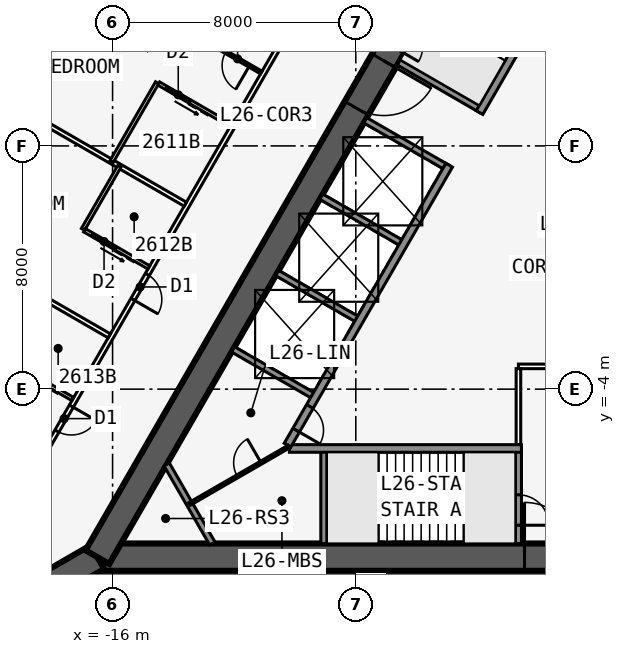
"""IFC4 building model, lengths in metres.
Left out: names, types, materials, properties, quantities, classifications, styles, units other than length and angle.
Written with IfcOpenShell. Run it as: python <this file> out.ifc"""

import sys

from ifc_helpers import new_model, si_unit, direction, frame, frame_2d, origin, place, context, subcontext, project, spatial, rectangle, extrude, element, fill, save


model = new_model("IFC4")
c1 = context("Model", 3, precision=1e-05, world=origin(), true_north=direction((0.0, 1.0)))
c2 = subcontext(c1, "Body", "Model", "MODEL_VIEW")
j1 = project(units=[si_unit("LENGTHUNIT", "METRE"), si_unit("PLANEANGLEUNIT", "RADIAN")], contexts=[c1])
p1 = place(None, origin())
s1 = spatial("IfcSite", under=j1, at=p1, CompositionType="ELEMENT")
p2 = place(p1, origin())
s2 = spatial("IfcBuilding", under=s1, at=p2, CompositionType="ELEMENT")
p3 = place(p2, frame((0.0, 0.0, 99.9)))
s3 = spatial("IfcBuildingStorey", under=s2, at=p3, CompositionType="ELEMENT", Elevation=99.9)
p4 = place(p3, frame((-16.5, -9.526, 0.0), z_axis=(0.0, 0.0, 1.0), x_axis=(1.0, 0.0, 0.0)))
e1 = element("IfcWall", 1, at=p4, inside=s3, PredefinedType="SHEAR", context=c2, shape_type="SweptSolid", body=[
    extrude(rectangle(XDim=33.0, YDim=0.9, at=frame_2d((16.5, 0.0))), origin(), (0.0, 0.0, 1.0), 3.4),
])
p5 = place(p4, frame((14.05, 0.0, 0.0)))
e2 = element("IfcOpeningElement", 2, at=p5, cuts=e1, PredefinedType="OPENING", context=c2, shape_type="SweptSolid", body=[
    extrude(rectangle(XDim=1.8, YDim=2.13, at=frame_2d((0.9, 1.065))), frame((0.0, 0.46, 0.0), z_axis=(0.0, -1.0, 0.0), x_axis=(1.0, 0.0, 0.0)), (0.0, 0.0, 1.0), 0.92),
])
p6 = place(p3, frame((-10.183, -5.951, 0.0), z_axis=(0.0, 0.0, 1.0), x_axis=(1.0, 0.0, 0.0)))
e3 = element("IfcWall", 3, at=p6, inside=s3, PredefinedType="SOLIDWALL", context=c2, shape_type="SweptSolid", body=[
    extrude(rectangle(XDim=7.633, YDim=0.25, at=frame_2d((3.816, 0.0))), origin(), (0.0, 0.0, 1.0), 3.15),
])
p7 = place(p3, frame((-9.05, -5.951, 0.0), z_axis=(0.0, 0.0, 1.0), x_axis=(0.0, -1.0, 0.0)))
e4 = element("IfcWall", 4, at=p7, inside=s3, PredefinedType="SOLIDWALL", context=c2, shape_type="SweptSolid", body=[
    extrude(rectangle(XDim=3.125, YDim=0.2, at=frame_2d((1.562, 0.0))), origin(), (0.0, 0.0, 1.0), 3.15),
])
p8 = place(p3, frame((-2.65, -5.951, 0.0), z_axis=(0.0, 0.0, 1.0), x_axis=(0.0, -1.0, 0.0)))
e5 = element("IfcWall", 5, at=p8, inside=s3, PredefinedType="SOLIDWALL", context=c2, shape_type="SweptSolid", body=[
    extrude(rectangle(XDim=3.125, YDim=0.2, at=frame_2d((1.562, 0.0))), origin(), (0.0, 0.0, 1.0), 3.15),
])
p9 = place(p8, frame((1.525, 0.0, 0.0)))
e6 = element("IfcOpeningElement", 6, at=p9, cuts=e5, PredefinedType="OPENING", context=c2, shape_type="SweptSolid", body=[
    extrude(rectangle(XDim=1.0, YDim=2.13, at=frame_2d((0.5, 1.065))), frame((0.0, 0.11, 0.0), z_axis=(0.0, -1.0, 0.0), x_axis=(1.0, 0.0, 0.0)), (0.0, 0.0, 1.0), 0.22),
])
p10 = place(p3, frame((0.0, 19.052, 0.0), z_axis=(0.0, 0.0, 1.0), x_axis=(-0.499999749417, -0.866025548458, 0.0)))
e7 = element("IfcWall", 7, at=p10, inside=s3, PredefinedType="SHEAR", context=c2, shape_type="SweptSolid", body=[
    extrude(rectangle(XDim=33.0, YDim=0.9, at=frame_2d((16.5, 0.0))), origin(), (0.0, 0.0, 1.0), 3.4),
])
p11 = place(p10, frame((14.15, 0.0, 0.0)))
e8 = element("IfcOpeningElement", 8, at=p11, cuts=e7, PredefinedType="OPENING", context=c2, shape_type="SweptSolid", body=[
    extrude(rectangle(XDim=1.8, YDim=2.13, at=frame_2d((0.9, 1.065))), frame((0.0, 0.46, 0.0), z_axis=(0.0, -1.0, 0.0), x_axis=(1.0, 0.0, 0.0)), (0.0, 0.0, 1.0), 0.92),
])
p12 = place(p10, frame((12.6, 0.0, 0.0)))
e9 = element("IfcOpeningElement", 9, at=p12, cuts=e7, PredefinedType="OPENING", context=c2, shape_type="SweptSolid", body=[
    extrude(rectangle(XDim=1.0, YDim=2.13, at=frame_2d((0.5, 1.065))), frame((0.0, 0.46, 0.0), z_axis=(0.0, -1.0, 0.0), x_axis=(1.0, 0.0, 0.0)), (0.0, 0.0, 1.0), 0.92),
])
p13 = place(p3, frame((-0.062, 11.794, 0.0), z_axis=(0.0, 0.0, 1.0), x_axis=(-0.500006680225, -0.86602154692, 0.0)))
e10 = element("IfcWall", 10, at=p13, inside=s3, PredefinedType="SOLIDWALL", context=c2, shape_type="SweptSolid", body=[
    extrude(rectangle(XDim=7.733, YDim=0.25, at=frame_2d((3.866, 0.0))), origin(), (0.0, 0.0, 1.0), 3.15),
])
p14 = place(p3, frame((-4.929, 3.365, 0.0), z_axis=(0.0, 0.0, 1.0), x_axis=(-0.499991433582, -0.866030349552, 0.0)))
e11 = element("IfcWall", 11, at=p14, inside=s3, PredefinedType="SOLIDWALL", context=c2, shape_type="SweptSolid", body=[
    extrude(rectangle(XDim=10.633, YDim=0.25, at=frame_2d((5.316, 0.0))), origin(), (0.0, 0.0, 1.0), 3.15),
])
p15 = place(p14, frame((9.164, 0.0, 0.0)))
e12 = element("IfcOpeningElement", 12, at=p15, cuts=e11, PredefinedType="OPENING", context=c2, shape_type="SweptSolid", body=[
    extrude(rectangle(XDim=0.9, YDim=2.13, at=frame_2d((0.45, 1.065))), frame((0.0, 0.135, 0.0), z_axis=(0.0, -1.0, 0.0), x_axis=(1.0, 0.0, 0.0)), (0.0, 0.0, 1.0), 0.27),
])
for number, where, z_axis, x_axis in (
    (13, (-3.879, 5.184, 0.0), (0.0, 0.0, 1.0), (-0.866, 0.5, 0.0)),
    (14, (-4.979, 3.279, 0.0), (0.0, 0.0, 1.0), (-0.866, 0.5, 0.0)),
    (15, (-6.429, 0.767, 0.0), (0.0, 0.0, 1.0), (-0.866, 0.5, 0.0)),
    (16, (-7.879, -1.744, 0.0), (0.0, 0.0, 1.0), (-0.866, 0.5, 0.0)),
    (17, (-9.329, -4.256, 0.0), (0.0, 0.0, 1.0), (-0.866, 0.5, 0.0)),
):
    element("IfcWall", number, at=place(p3, frame(where, z_axis=z_axis, x_axis=x_axis)), inside=s3, PredefinedType="SOLIDWALL", context=c2, shape_type="SweptSolid", body=[
        extrude(rectangle(XDim=3.125, YDim=0.2, at=frame_2d((1.562, 0.0))), origin(), (0.0, 0.0, 1.0), 3.15),
    ])
p16 = place(p3, frame((-16.5, -9.526, 0.0), z_axis=(0.0, 0.0, 1.0), x_axis=(-0.866031398331, -0.499989616998, 0.0)))
e18 = element("IfcWall", 18, at=p16, inside=s3, PredefinedType="SHEAR", context=c2, shape_type="SweptSolid", body=[
    extrude(rectangle(XDim=4.746, YDim=0.9, at=frame_2d((2.373, 0.0))), origin(), (0.0, 0.0, 1.0), 3.4),
])
p17 = place(p16, frame((1.8, 0.0, 0.0)))
e19 = element("IfcOpeningElement", 19, at=p17, cuts=e18, PredefinedType="OPENING", context=c2, shape_type="SweptSolid", body=[
    extrude(rectangle(XDim=1.8, YDim=2.13, at=frame_2d((0.9, 1.065))), frame((0.0, 0.46, 0.0), z_axis=(0.0, -1.0, 0.0), x_axis=(1.0, 0.0, 0.0)), (0.0, 0.0, 1.0), 0.92),
])
p18 = place(p3, frame((-0.5, 24.636, 0.0), z_axis=(0.0, 0.0, 1.0), x_axis=(-0.500001915564, -0.86602429783, 0.0)))
e20 = element("IfcWall", 20, at=p18, inside=s3, PredefinedType="PARTITIONING", context=c2, shape_type="SweptSolid", body=[
    extrude(rectangle(XDim=42.172, YDim=0.15, at=frame_2d((21.086, 0.0))), origin(), (0.0, 0.0, 1.0), 3.15),
])
p19 = place(p18, frame((1.911, 0.0, 0.0)))
e21 = element("IfcOpeningElement", 21, at=p19, cuts=e20, PredefinedType="OPENING", context=c2, shape_type="SweptSolid", body=[
    extrude(rectangle(XDim=0.95, YDim=2.13, at=frame_2d((0.475, 1.065))), frame((0.0, 0.085, 0.0), z_axis=(0.0, -1.0, 0.0), x_axis=(1.0, 0.0, 0.0)), (0.0, 0.0, 1.0), 0.17),
])
p20 = place(p18, frame((8.111, 0.0, 0.0)))
e22 = element("IfcOpeningElement", 22, at=p20, cuts=e20, PredefinedType="OPENING", context=c2, shape_type="SweptSolid", body=[
    extrude(rectangle(XDim=0.95, YDim=2.13, at=frame_2d((0.475, 1.065))), frame((0.0, 0.085, 0.0), z_axis=(0.0, -1.0, 0.0), x_axis=(1.0, 0.0, 0.0)), (0.0, 0.0, 1.0), 0.17),
])
p21 = place(p18, frame((18.111, 0.0, 0.0)))
e23 = element("IfcOpeningElement", 23, at=p21, cuts=e20, PredefinedType="OPENING", context=c2, shape_type="SweptSolid", body=[
    extrude(rectangle(XDim=0.95, YDim=2.13, at=frame_2d((0.475, 1.065))), frame((0.0, 0.085, 0.0), z_axis=(0.0, -1.0, 0.0), x_axis=(1.0, 0.0, 0.0)), (0.0, 0.0, 1.0), 0.17),
])
p22 = place(p18, frame((28.711, 0.0, 0.0)))
e24 = element("IfcOpeningElement", 24, at=p22, cuts=e20, PredefinedType="OPENING", context=c2, shape_type="SweptSolid", body=[
    extrude(rectangle(XDim=0.95, YDim=2.13, at=frame_2d((0.475, 1.065))), frame((0.0, 0.085, 0.0), z_axis=(0.0, -1.0, 0.0), x_axis=(1.0, 0.0, 0.0)), (0.0, 0.0, 1.0), 0.17),
])
p23 = place(p18, frame((33.711, 0.0, 0.0)))
e25 = element("IfcOpeningElement", 25, at=p23, cuts=e20, PredefinedType="OPENING", context=c2, shape_type="SweptSolid", body=[
    extrude(rectangle(XDim=0.95, YDim=2.13, at=frame_2d((0.475, 1.065))), frame((0.0, 0.085, 0.0), z_axis=(0.0, -1.0, 0.0), x_axis=(1.0, 0.0, 0.0)), (0.0, 0.0, 1.0), 0.17),
])
p24 = place(p18, frame((39.311, 0.0, 0.0)))
e26 = element("IfcOpeningElement", 26, at=p24, cuts=e20, PredefinedType="OPENING", context=c2, shape_type="SweptSolid", body=[
    extrude(rectangle(XDim=0.95, YDim=2.13, at=frame_2d((0.475, 1.065))), frame((0.0, 0.085, 0.0), z_axis=(0.0, -1.0, 0.0), x_axis=(1.0, 0.0, 0.0)), (0.0, 0.0, 1.0), 0.17),
])
p25 = place(p3, frame((-11.108, 6.413, 0.0), z_axis=(0.0, 0.0, 1.0), x_axis=(-0.866022450903, 0.500005114506, 0.0)))
e27 = element("IfcWall", 27, at=p25, inside=s3, PredefinedType="PARTITIONING", context=c2, shape_type="SweptSolid", body=[
    extrude(rectangle(XDim=9.196, YDim=0.1, at=frame_2d((4.598, 0.0))), origin(), (0.0, 0.0, 1.0), 2.109),
])
p26 = place(p25, frame((0.45, 0.0, 0.0)))
e28 = element("IfcOpeningElement", 28, at=p26, cuts=e27, PredefinedType="OPENING", context=c2, shape_type="SweptSolid", body=[
    extrude(rectangle(XDim=0.9, YDim=2.032, at=frame_2d((0.45, 1.016))), frame((0.0, 0.06, 0.0), z_axis=(0.0, -1.0, 0.0), x_axis=(1.0, 0.0, 0.0)), (0.0, 0.0, 1.0), 0.12),
])
p27 = place(p3, frame((-13.608, 2.083, 0.0), z_axis=(0.0, 0.0, 1.0), x_axis=(-0.866028232062, 0.499995101247, 0.0)))
e29 = element("IfcWall", 29, at=p27, inside=s3, PredefinedType="PARTITIONING", context=c2, shape_type="SweptSolid", body=[
    extrude(rectangle(XDim=9.043, YDim=0.15, at=frame_2d((4.521, 0.0))), origin(), (0.0, 0.0, 1.0), 2.05),
])
p28 = place(p3, frame((-16.108, -2.247, 0.0), z_axis=(0.0, 0.0, 1.0), x_axis=(-0.866018881988, 0.500011295912, 0.0)))
e30 = element("IfcWall", 30, at=p28, inside=s3, PredefinedType="PARTITIONING", context=c2, shape_type="SweptSolid", body=[
    extrude(rectangle(XDim=8.585, YDim=0.15, at=frame_2d((4.292, 0.0))), origin(), (0.0, 0.0, 1.0), 2.109),
])
p29 = place(p3, frame((-14.533, 6.081, 0.0), z_axis=(0.0, 0.0, 1.0), x_axis=(-0.499990139034, -0.866031096941, 0.0)))
e31 = element("IfcWall", 31, at=p29, inside=s3, PredefinedType="PLUMBINGWALL", context=c2, shape_type="SweptSolid", body=[
    extrude(rectangle(XDim=3.0, YDim=0.12, at=frame_2d((1.5, 0.0))), origin(), (0.0, 0.0, 1.0), 3.15),
])
p30 = place(p3, frame((-12.108, 4.681, 0.0), z_axis=(0.0, 0.0, 1.0), x_axis=(-0.866035715982, 0.499982138324, 0.0)))
e32 = element("IfcWall", 32, at=p30, inside=s3, PredefinedType="PLUMBINGWALL", context=c2, shape_type="SweptSolid", body=[
    extrude(rectangle(XDim=2.74, YDim=0.12, at=frame_2d((1.37, 0.0))), origin(), (0.0, 0.0, 1.0), 3.15),
])
p31 = place(p30, frame((1.55, 0.0, 0.0)))
e33 = element("IfcOpeningElement", 33, at=p31, cuts=e32, PredefinedType="OPENING", context=c2, shape_type="SweptSolid", body=[
    extrude(rectangle(XDim=0.9, YDim=2.13, at=frame_2d((0.45, 1.065))), frame((0.0, 0.07, 0.0), z_axis=(0.0, -1.0, 0.0), x_axis=(1.0, 0.0, 0.0)), (0.0, 0.0, 1.0), 0.14),
])
p32 = place(p3, frame((-15.773, 3.333, 0.0), z_axis=(0.0, 0.0, 1.0), x_axis=(-0.500001309137, -0.866024647952, 0.0)))
e34 = element("IfcWall", 34, at=p32, inside=s3, PredefinedType="PLUMBINGWALL", context=c2, shape_type="SweptSolid", body=[
    extrude(rectangle(XDim=2.4, YDim=0.12, at=frame_2d((1.2, 0.0))), origin(), (0.0, 0.0, 1.0), 3.15),
])
p33 = place(p3, frame((-14.808, 0.005, 0.0), z_axis=(0.0, 0.0, 1.0), x_axis=(-0.866023955769, 0.500002508028, 0.0)))
e35 = element("IfcWall", 35, at=p33, inside=s3, PredefinedType="PLUMBINGWALL", context=c2, shape_type="SweptSolid", body=[
    extrude(rectangle(XDim=2.44, YDim=0.12, at=frame_2d((1.22, 0.0))), origin(), (0.0, 0.0, 1.0), 3.15),
])
p34 = place(p33, frame((1.25, 0.0, 0.0)))
e36 = element("IfcOpeningElement", 36, at=p34, cuts=e35, PredefinedType="OPENING", context=c2, shape_type="SweptSolid", body=[
    extrude(rectangle(XDim=0.9, YDim=2.13, at=frame_2d((0.45, 1.065))), frame((0.0, 0.07, 0.0), z_axis=(0.0, -1.0, 0.0), x_axis=(1.0, 0.0, 0.0)), (0.0, 0.0, 1.0), 0.14),
])
p35 = place(p3, frame((-17.308, -4.326, 0.0), z_axis=(0.0, 0.0, 1.0), x_axis=(-0.866023955769, 0.500002508028, 0.0)))
e37 = element("IfcWall", 37, at=p35, inside=s3, PredefinedType="PLUMBINGWALL", context=c2, shape_type="SweptSolid", body=[
    extrude(rectangle(XDim=2.44, YDim=0.12, at=frame_2d((1.22, 0.0))), origin(), (0.0, 0.0, 1.0), 3.15),
])
p36 = place(p35, frame((1.25, 0.0, 0.0)))
e38 = element("IfcOpeningElement", 38, at=p36, cuts=e37, PredefinedType="OPENING", context=c2, shape_type="SweptSolid", body=[
    extrude(rectangle(XDim=0.9, YDim=2.13, at=frame_2d((0.45, 1.065))), frame((0.0, 0.07, 0.0), z_axis=(0.0, -1.0, 0.0), x_axis=(1.0, 0.0, 0.0)), (0.0, 0.0, 1.0), 0.14),
])
p37 = place(p3, frame((-2.65, -3.251, 0.0), z_axis=(0.0, 0.0, 1.0), x_axis=(1.0, 0.0, 0.0)))
e39 = element("IfcWall", 39, at=p37, inside=s3, PredefinedType="PARTITIONING", context=c2, shape_type="SweptSolid", body=[
    extrude(rectangle(XDim=8.35, YDim=0.15, at=frame_2d((4.175, 0.0))), origin(), (0.0, 0.0, 1.0), 3.15),
])
p38 = place(p3, frame((-2.65, -5.826, 0.0), z_axis=(0.0, 0.0, 1.0), x_axis=(0.0, 1.0, 0.0)))
e40 = element("IfcWall", 40, at=p38, inside=s3, PredefinedType="PARTITIONING", context=c2, shape_type="SweptSolid", body=[
    extrude(rectangle(XDim=2.5, YDim=0.15, at=frame_2d((1.25, 0.0))), origin(), (0.0, 0.0, 1.0), 3.15),
])
p39 = place(p3, frame((-12.719, -9.076, 0.0), z_axis=(0.0, 0.0, 1.0), x_axis=(-0.499952404951, 0.866052881055, 0.0)))
e41 = element("IfcWall", 41, at=p39, inside=s3, PredefinedType="SOLIDWALL", context=c2, shape_type="SweptSolid", body=[
    extrude(rectangle(XDim=3.002, YDim=0.2, at=frame_2d((1.501, 0.0))), origin(), (0.0, 0.0, 1.0), 3.15),
])
p40 = place(p3, frame((-13.469, -7.776, 0.0), z_axis=(0.0, 0.0, 1.0), x_axis=(0.866021898093, 0.500006071987, 0.0)))
e42 = element("IfcWall", 42, at=p40, inside=s3, PredefinedType="PARTITIONING", context=c2, shape_type="SweptSolid", body=[
    extrude(rectangle(XDim=3.775, YDim=0.1, at=frame_2d((1.888, 0.0))), origin(), (0.0, 0.0, 1.0), 3.15),
])
p41 = place(p40, frame((1.815, 0.0, 0.0)))
e43 = element("IfcOpeningElement", 43, at=p41, cuts=e42, PredefinedType="OPENING", context=c2, shape_type="SweptSolid", body=[
    extrude(rectangle(XDim=0.9, YDim=2.13, at=frame_2d((0.45, 1.065))), frame((0.0, 0.06, 0.0), z_axis=(0.0, -1.0, 0.0), x_axis=(1.0, 0.0, 0.0)), (0.0, 0.0, 1.0), 0.12),
])
p42 = place(p3, frame((-7.247, -7.576, 0.0), z_axis=(0.0, 0.0, 1.0), x_axis=(1.0, 0.0, 0.0)))
e44 = element("IfcWall", 44, at=p42, inside=s3, PredefinedType="SOLIDWALL", context=c2, shape_type="SweptSolid", body=[
    extrude(rectangle(XDim=2.794, YDim=0.1, at=frame_2d((1.397, 0.0))), origin(), (0.0, 0.0, 1.0), 3.4),
])
p43 = place(p26, origin())
e45 = element("IfcDoor", 45, at=p43, inside=s3, OperationType="SINGLE_SWING_LEFT", PredefinedType="DOOR", context=c2, shape_type="SweptSolid", body=[
    extrude(rectangle(XDim=0.9, YDim=2.032, at=frame_2d((0.45, 1.016))), frame((0.0, 0.025, 0.0), z_axis=(0.0, -1.0, 0.0), x_axis=(1.0, 0.0, 0.0)), (0.0, 0.0, 1.0), 0.05),
])
fill(e28, e45)
p44 = place(p31, origin())
e46 = element("IfcDoor", 46, at=p44, inside=s3, OperationType="SLIDING_TO_LEFT", PredefinedType="DOOR", context=c2, shape_type="SweptSolid", body=[
    extrude(rectangle(XDim=0.9, YDim=2.13, at=frame_2d((0.45, 1.065))), frame((0.0, 0.025, 0.0), z_axis=(0.0, -1.0, 0.0), x_axis=(1.0, 0.0, 0.0)), (0.0, 0.0, 1.0), 0.05),
])
fill(e33, e46)
p45 = place(p34, origin())
e47 = element("IfcDoor", 47, at=p45, inside=s3, OperationType="SLIDING_TO_LEFT", PredefinedType="DOOR", context=c2, shape_type="SweptSolid", body=[
    extrude(rectangle(XDim=0.9, YDim=2.13, at=frame_2d((0.45, 1.065))), frame((0.0, 0.025, 0.0), z_axis=(0.0, -1.0, 0.0), x_axis=(1.0, 0.0, 0.0)), (0.0, 0.0, 1.0), 0.05),
])
fill(e36, e47)
p46 = place(p22, origin())
e48 = element("IfcDoor", 48, at=p46, inside=s3, OperationType="SINGLE_SWING_RIGHT", PredefinedType="DOOR", context=c2, shape_type="SweptSolid", body=[
    extrude(rectangle(XDim=0.95, YDim=2.13, at=frame_2d((0.475, 1.065))), frame((0.0, 0.025, 0.0), z_axis=(0.0, -1.0, 0.0), x_axis=(1.0, 0.0, 0.0)), (0.0, 0.0, 1.0), 0.05),
])
fill(e24, e48)
p47 = place(p23, origin())
e49 = element("IfcDoor", 49, at=p47, inside=s3, OperationType="SINGLE_SWING_LEFT", PredefinedType="DOOR", context=c2, shape_type="SweptSolid", body=[
    extrude(rectangle(XDim=0.95, YDim=2.13, at=frame_2d((0.475, 1.065))), frame((0.0, 0.025, 0.0), z_axis=(0.0, -1.0, 0.0), x_axis=(1.0, 0.0, 0.0)), (0.0, 0.0, 1.0), 0.05),
])
fill(e25, e49)
p48 = place(p5, origin())
e50 = element("IfcDoor", 50, at=p48, inside=s3, OperationType="DOUBLE_DOOR_SINGLE_SWING", PredefinedType="DOOR", context=c2, shape_type="SweptSolid", body=[
    extrude(rectangle(XDim=1.8, YDim=2.13, at=frame_2d((0.9, 1.065))), frame((0.0, 0.025, 0.0), z_axis=(0.0, -1.0, 0.0), x_axis=(1.0, 0.0, 0.0)), (0.0, 0.0, 1.0), 0.05),
])
fill(e2, e50)
p49 = place(p9, origin())
e51 = element("IfcDoor", 51, at=p49, inside=s3, OperationType="SINGLE_SWING_RIGHT", PredefinedType="DOOR", context=c2, shape_type="SweptSolid", body=[
    extrude(rectangle(XDim=1.0, YDim=2.13, at=frame_2d((0.5, 1.065))), frame((0.0, 0.025, 0.0), z_axis=(0.0, -1.0, 0.0), x_axis=(1.0, 0.0, 0.0)), (0.0, 0.0, 1.0), 0.05),
])
fill(e6, e51)
p50 = place(p11, origin())
e52 = element("IfcDoor", 52, at=p50, inside=s3, OperationType="DOUBLE_DOOR_SINGLE_SWING", PredefinedType="DOOR", context=c2, shape_type="SweptSolid", body=[
    extrude(rectangle(XDim=1.8, YDim=2.13, at=frame_2d((0.9, 1.065))), frame((0.0, 0.025, 0.0), z_axis=(0.0, -1.0, 0.0), x_axis=(1.0, 0.0, 0.0)), (0.0, 0.0, 1.0), 0.05),
])
fill(e8, e52)
p51 = place(p15, origin())
e53 = element("IfcDoor", 53, at=p51, inside=s3, OperationType="SINGLE_SWING_RIGHT", PredefinedType="DOOR", context=c2, shape_type="SweptSolid", body=[
    extrude(rectangle(XDim=0.9, YDim=2.13, at=frame_2d((0.45, 1.065))), frame((0.0, 0.025, 0.0), z_axis=(0.0, -1.0, 0.0), x_axis=(1.0, 0.0, 0.0)), (0.0, 0.0, 1.0), 0.05),
])
fill(e12, e53)
p52 = place(p41, origin())
e54 = element("IfcDoor", 54, at=p52, inside=s3, OperationType="SINGLE_SWING_RIGHT", PredefinedType="DOOR", context=c2, shape_type="SweptSolid", body=[
    extrude(rectangle(XDim=0.9, YDim=2.13, at=frame_2d((0.45, 1.065))), frame((0.0, 0.025, 0.0), z_axis=(0.0, -1.0, 0.0), x_axis=(1.0, 0.0, 0.0)), (0.0, 0.0, 1.0), 0.05),
])
fill(e43, e54)
save(model, sys.argv[1])
